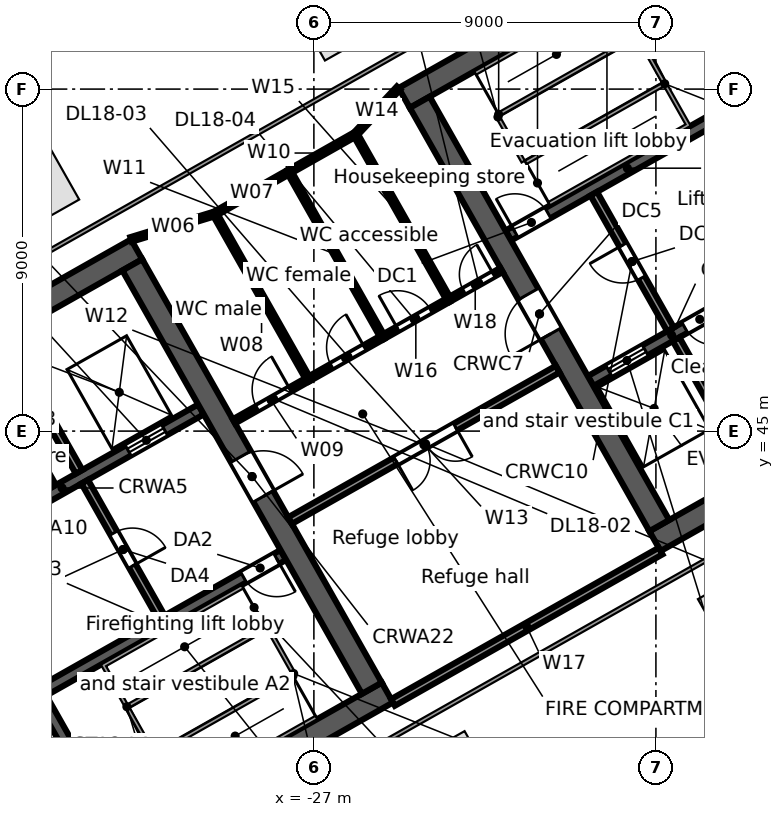
"""IFC4 building model, lengths in metres.
Left out: names, types, materials, properties, quantities, classifications, styles, units other than length and angle.
Written with IfcOpenShell. Run it as: python <this file> out.ifc"""

import sys

from ifc_helpers import new_model, si_unit, direction, frame, frame_2d, origin, origin_2d, place, context, subcontext, project, spatial, rectangle, extrude, element, fill, save


model = new_model("IFC4")
c1 = context("Model", 3, precision=1e-05, world=origin(), true_north=direction((0.0, 1.0)))
c2 = subcontext(c1, "Body", "Model", "MODEL_VIEW")
j1 = project(units=[si_unit("LENGTHUNIT", "METRE"), si_unit("PLANEANGLEUNIT", "RADIAN")], contexts=[c1])
p1 = place(None, origin())
s1 = spatial("IfcSite", under=j1, at=p1, CompositionType="ELEMENT")
p2 = place(p1, origin())
s2 = spatial("IfcBuilding", under=s1, at=p2, CompositionType="ELEMENT")
p3 = place(p2, frame((0.0, 0.0, 91.5)))
s3 = spatial("IfcBuildingStorey", under=s2, at=p3, CompositionType="ELEMENT", Elevation=91.5)
for number, where, z_axis, x_axis in (
    (1, (-26.388, 55.91, 0.0), (0.0, 0.0, 1.0), (-0.87, -0.492, 0.0)),
    (2, (-34.334, 51.414, 0.0), (0.0, 0.0, 1.0), (-0.87, -0.492, 0.0)),
    (3, (-23.356, 35.946, 0.0), (0.0, 0.0, 1.0), (0.87, 0.492, 0.0)),
    (4, (-15.736, 40.257, 0.0), (0.0, 0.0, 1.0), (0.87, 0.492, 0.0)),
):
    element("IfcColumn", number, at=place(p3, frame(where, z_axis=z_axis, x_axis=x_axis)), inside=s3, PredefinedType="COLUMN", context=c2, shape_type="SweptSolid", body=[
        extrude(rectangle(XDim=1.7, YDim=1.7, at=origin_2d()), origin(), (0.0, 0.0, 1.0), 5.6),
    ])
p4 = place(p3, frame((-39.862, 29.749, 0.0), z_axis=(0.0, 0.0, 1.0), x_axis=(0.870350116061, 0.492433422375, 0.0)))
e5 = element("IfcWall", 5, at=p4, inside=s3, PredefinedType="SOLIDWALL", context=c2, shape_type="SweptSolid", body=[
    extrude(rectangle(XDim=17.0, YDim=0.6, at=frame_2d((8.5, 0.0))), origin(), (0.0, 0.0, 1.0), 5.28),
])
p5 = place(p4, frame((7.2, 0.0, 0.0)))
e6 = element("IfcOpeningElement", 6, at=p5, cuts=e5, PredefinedType="OPENING", context=c2, shape_type="SweptSolid", body=[
    extrude(rectangle(XDim=1.2, YDim=2.1, at=frame_2d((0.6, 1.05))), frame((0.0, 0.31, 0.0), z_axis=(0.0, -1.0, 0.0), x_axis=(1.0, 0.0, 0.0)), (0.0, 0.0, 1.0), 0.62),
])
p6 = place(p3, frame((-34.245, 38.097, 0.0), z_axis=(0.0, 0.0, 1.0), x_axis=(0.870364910201, 0.492407273597, 0.0)))
e7 = element("IfcWall", 7, at=p6, inside=s3, PredefinedType="SOLIDWALL", context=c2, shape_type="SweptSolid", body=[
    extrude(rectangle(XDim=7.4, YDim=0.3, at=frame_2d((3.7, 0.0))), origin(), (0.0, 0.0, 1.0), 5.28),
])
p7 = place(p6, frame((6.2, 0.0, 0.0)))
e8 = element("IfcOpeningElement", 8, at=p7, cuts=e7, PredefinedType="OPENING", context=c2, shape_type="SweptSolid", body=[
    extrude(rectangle(XDim=1.0, YDim=2.1, at=frame_2d((0.5, 1.05))), frame((0.0, 0.16, 0.0), z_axis=(0.0, -1.0, 0.0), x_axis=(1.0, 0.0, 0.0)), (0.0, 0.0, 1.0), 0.32),
])
p8 = place(p3, frame((-37.282, 41.435, 0.0), z_axis=(0.0, 0.0, 1.0), x_axis=(0.870356516133, 0.492422110414, 0.0)))
e9 = element("IfcWall", 9, at=p8, inside=s3, PredefinedType="SOLIDWALL", context=c2, shape_type="SweptSolid", body=[
    extrude(rectangle(XDim=8.4, YDim=0.3, at=frame_2d((4.2, 0.0))), origin(), (0.0, 0.0, 1.0), 5.28),
])
p9 = place(p8, frame((6.2, 0.0, 0.0)))
e10 = element("IfcOpeningElement", 10, at=p9, cuts=e9, PredefinedType="OPENING", context=c2, shape_type="SweptSolid", body=[
    extrude(rectangle(XDim=1.1, YDim=2.1, at=frame_2d((0.55, 1.05))), frame((0.0, 0.16, 0.0), z_axis=(0.0, -1.0, 0.0), x_axis=(1.0, 0.0, 0.0)), (0.0, 0.0, 1.0), 0.32),
])
p10 = place(p8, frame((1.55, 0.0, 0.0)))
e11 = element("IfcOpeningElement", 11, at=p10, cuts=e9, PredefinedType="OPENING", context=c2, shape_type="SweptSolid", body=[
    extrude(rectangle(XDim=0.9, YDim=2.1, at=frame_2d((0.45, 1.05))), frame((0.0, 0.16, 0.0), z_axis=(0.0, -1.0, 0.0), x_axis=(1.0, 0.0, 0.0)), (0.0, 0.0, 1.0), 0.32),
])
p11 = place(p3, frame((-46.461, 41.412, 0.0), z_axis=(0.0, 0.0, 1.0), x_axis=(0.870350116061, 0.492433422375, 0.0)))
e12 = element("IfcWall", 12, at=p11, inside=s3, PredefinedType="SOLIDWALL", context=c2, shape_type="SweptSolid", body=[
    extrude(rectangle(XDim=17.0, YDim=0.6, at=frame_2d((8.5, 0.0))), origin(), (0.0, 0.0, 1.0), 5.28),
])
p12 = place(p3, frame((-34.171, 37.967, 0.0), z_axis=(0.0, 0.0, 1.0), x_axis=(0.492394910396, -0.870371904542, 0.0)))
e13 = element("IfcWall", 13, at=p12, inside=s3, PredefinedType="SOLIDWALL", context=c2, shape_type="SweptSolid", body=[
    extrude(rectangle(XDim=4.05, YDim=0.3, at=frame_2d((2.025, 0.0))), origin(), (0.0, 0.0, 1.0), 5.28),
])
p13 = place(p3, frame((-35.869, 47.06, 0.0), z_axis=(0.0, 0.0, 1.0), x_axis=(0.49241474071, -0.870360685654, 0.0)))
e14 = element("IfcWall", 14, at=p13, inside=s3, PredefinedType="SOLIDWALL", context=c2, shape_type="SweptSolid", body=[
    extrude(rectangle(XDim=4.05, YDim=0.2, at=frame_2d((2.025, 0.0))), origin(), (0.0, 0.0, 1.0), 5.28),
])
p14 = place(p3, frame((-33.031, 43.667, 0.0), z_axis=(0.0, 0.0, 1.0), x_axis=(0.492408451753, -0.87036424366, 0.0)))
e15 = element("IfcWall", 15, at=p14, inside=s3, PredefinedType="PARTITIONING", context=c2, shape_type="SweptSolid", body=[
    extrude(rectangle(XDim=4.1, YDim=0.2, at=frame_2d((2.05, 0.0))), origin(), (0.0, 0.0, 1.0), 5.28),
])
p15 = place(p14, frame((1.55, 0.0, 0.0)))
e16 = element("IfcOpeningElement", 16, at=p15, cuts=e15, PredefinedType="OPENING", context=c2, shape_type="SweptSolid", body=[
    extrude(rectangle(XDim=1.0, YDim=2.1, at=frame_2d((0.5, 1.05))), frame((0.0, 0.11, 0.0), z_axis=(0.0, -1.0, 0.0), x_axis=(1.0, 0.0, 0.0)), (0.0, 0.0, 1.0), 0.22),
])
p16 = place(p3, frame((-35.173, 47.454, 0.0), z_axis=(0.0, 0.0, 1.0), x_axis=(0.492440575896, -0.870346068648, 0.0)))
e17 = element("IfcWall", 17, at=p16, inside=s3, PredefinedType="SOLIDWALL", context=c2, shape_type="SweptSolid", body=[
    extrude(rectangle(XDim=4.05, YDim=0.2, at=frame_2d((2.025, 0.0))), origin(), (0.0, 0.0, 1.0), 5.28),
])
p17 = place(p3, frame((-31.778, 49.374, 0.0), z_axis=(0.0, 0.0, 1.0), x_axis=(0.492433046652, -0.870350328641, 0.0)))
e18 = element("IfcWall", 18, at=p17, inside=s3, PredefinedType="SOLIDWALL", context=c2, shape_type="SweptSolid", body=[
    extrude(rectangle(XDim=12.8, YDim=0.6, at=frame_2d((6.4, 0.0))), origin(), (0.0, 0.0, 1.0), 5.28),
])
p18 = place(p17, frame((5.8, 0.0, 0.0)))
e19 = element("IfcOpeningElement", 19, at=p18, cuts=e18, PredefinedType="OPENING", context=c2, shape_type="SweptSolid", body=[
    extrude(rectangle(XDim=1.2, YDim=2.1, at=frame_2d((0.6, 1.05))), frame((0.0, 0.31, 0.0), z_axis=(0.0, -1.0, 0.0), x_axis=(1.0, 0.0, 0.0)), (0.0, 0.0, 1.0), 0.62),
])
p19 = place(p3, frame((-18.024, 42.104, 0.0), z_axis=(0.0, 0.0, 1.0), x_axis=(0.870360574057, 0.492414937962, 0.0)))
e20 = element("IfcWall", 20, at=p19, inside=s3, PredefinedType="SOLIDWALL", context=c2, shape_type="SweptSolid", body=[
    extrude(rectangle(XDim=15.0, YDim=0.6, at=frame_2d((7.5, 0.0))), origin(), (0.0, 0.0, 1.0), 5.28),
])
p20 = place(p19, frame((6.1, 0.0, 0.0)))
e21 = element("IfcOpeningElement", 21, at=p20, cuts=e20, PredefinedType="OPENING", context=c2, shape_type="SweptSolid", body=[
    extrude(rectangle(XDim=1.2, YDim=2.1, at=frame_2d((0.6, 1.05))), frame((0.0, 0.31, 0.0), z_axis=(0.0, -1.0, 0.0), x_axis=(1.0, 0.0, 0.0)), (0.0, 0.0, 1.0), 0.62),
])
p21 = place(p3, frame((-19.718, 46.316, 0.0), z_axis=(0.0, 0.0, 1.0), x_axis=(0.870353963862, 0.492426621528, 0.0)))
e22 = element("IfcWall", 22, at=p21, inside=s3, PredefinedType="SOLIDWALL", context=c2, shape_type="SweptSolid", body=[
    extrude(rectangle(XDim=4.9, YDim=0.3, at=frame_2d((2.45, 0.0))), origin(), (0.0, 0.0, 1.0), 5.28),
])
p22 = place(p21, frame((0.55, 0.0, 0.0)))
e23 = element("IfcOpeningElement", 23, at=p22, cuts=e22, PredefinedType="OPENING", context=c2, shape_type="SweptSolid", body=[
    extrude(rectangle(XDim=1.1, YDim=2.1, at=frame_2d((0.55, 1.05))), frame((0.0, 0.16, 0.0), z_axis=(0.0, -1.0, 0.0), x_axis=(1.0, 0.0, 0.0)), (0.0, 0.0, 1.0), 0.32),
])
p23 = place(p21, frame((2.85, 0.0, 0.0)))
e24 = element("IfcOpeningElement", 24, at=p23, cuts=e22, PredefinedType="OPENING", context=c2, shape_type="SweptSolid", body=[
    extrude(rectangle(XDim=0.9, YDim=2.1, at=frame_2d((0.45, 1.05))), frame((0.0, 0.16, 0.0), z_axis=(0.0, -1.0, 0.0), x_axis=(1.0, 0.0, 0.0)), (0.0, 0.0, 1.0), 0.32),
])
p24 = place(p3, frame((-21.885, 50.146, 0.0), z_axis=(0.0, 0.0, 1.0), x_axis=(0.870359411463, 0.492416992881, 0.0)))
e25 = element("IfcWall", 25, at=p24, inside=s3, PredefinedType="SOLIDWALL", context=c2, shape_type="SweptSolid", body=[
    extrude(rectangle(XDim=7.2, YDim=0.3, at=frame_2d((3.6, 0.0))), origin(), (0.0, 0.0, 1.0), 5.28),
])
p25 = place(p24, frame((0.2, 0.0, 0.0)))
e26 = element("IfcOpeningElement", 26, at=p25, cuts=e25, PredefinedType="OPENING", context=c2, shape_type="SweptSolid", body=[
    extrude(rectangle(XDim=1.0, YDim=2.1, at=frame_2d((0.5, 1.05))), frame((0.0, 0.16, 0.0), z_axis=(0.0, -1.0, 0.0), x_axis=(1.0, 0.0, 0.0)), (0.0, 0.0, 1.0), 0.32),
])
p26 = place(p3, frame((-24.623, 53.767, 0.0), z_axis=(0.0, 0.0, 1.0), x_axis=(0.870356627484, 0.492421913601, 0.0)))
e27 = element("IfcWall", 27, at=p26, inside=s3, PredefinedType="SOLIDWALL", context=c2, shape_type="SweptSolid", body=[
    extrude(rectangle(XDim=15.0, YDim=0.6, at=frame_2d((7.5, 0.0))), origin(), (0.0, 0.0, 1.0), 5.28),
])
p27 = place(p3, frame((-24.214, 53.654, 0.0), z_axis=(0.0, 0.0, 1.0), x_axis=(0.492441221355, -0.870345703448, 0.0)))
e28 = element("IfcWall", 28, at=p27, inside=s3, PredefinedType="SOLIDWALL", context=c2, shape_type="SweptSolid", body=[
    extrude(rectangle(XDim=12.8, YDim=0.6, at=frame_2d((6.4, 0.0))), origin(), (0.0, 0.0, 1.0), 5.28),
])
p28 = place(p27, frame((5.8, 0.0, 0.0)))
e29 = element("IfcOpeningElement", 29, at=p28, cuts=e28, PredefinedType="OPENING", context=c2, shape_type="SweptSolid", body=[
    extrude(rectangle(XDim=1.2, YDim=2.1, at=frame_2d((0.6, 1.05))), frame((0.0, 0.31, 0.0), z_axis=(0.0, -1.0, 0.0), x_axis=(1.0, 0.0, 0.0)), (0.0, 0.0, 1.0), 0.62),
])
p29 = place(p3, frame((-17.469, 47.417, 0.0), z_axis=(0.0, 0.0, 1.0), x_axis=(0.492440575896, -0.870346068648, 0.0)))
e30 = element("IfcWall", 30, at=p29, inside=s3, PredefinedType="SOLIDWALL", context=c2, shape_type="SweptSolid", body=[
    extrude(rectangle(XDim=4.05, YDim=0.2, at=frame_2d((2.025, 0.0))), origin(), (0.0, 0.0, 1.0), 5.28),
])
p30 = place(p3, frame((-19.635, 51.246, 0.0), z_axis=(0.0, 0.0, 1.0), x_axis=(0.492408451753, -0.87036424366, 0.0)))
e31 = element("IfcWall", 31, at=p30, inside=s3, PredefinedType="PARTITIONING", context=c2, shape_type="SweptSolid", body=[
    extrude(rectangle(XDim=4.1, YDim=0.2, at=frame_2d((2.05, 0.0))), origin(), (0.0, 0.0, 1.0), 5.28),
])
p31 = place(p30, frame((1.55, 0.0, 0.0)))
e32 = element("IfcOpeningElement", 32, at=p31, cuts=e31, PredefinedType="OPENING", context=c2, shape_type="SweptSolid", body=[
    extrude(rectangle(XDim=1.0, YDim=2.1, at=frame_2d((0.5, 1.05))), frame((0.0, 0.11, 0.0), z_axis=(0.0, -1.0, 0.0), x_axis=(1.0, 0.0, 0.0)), (0.0, 0.0, 1.0), 0.22),
])
p32 = place(p3, frame((-17.686, 57.347, 0.0), z_axis=(0.0, 0.0, 1.0), x_axis=(0.492420746998, -0.870357287513, 0.0)))
e33 = element("IfcWall", 33, at=p32, inside=s3, PredefinedType="SOLIDWALL", context=c2, shape_type="SweptSolid", body=[
    extrude(rectangle(XDim=4.05, YDim=0.3, at=frame_2d((2.025, 0.0))), origin(), (0.0, 0.0, 1.0), 5.28),
])
p33 = place(p3, frame((-31.812, 50.044, 0.0), z_axis=(0.0, 0.0, 1.0), x_axis=(0.956397612161, 0.292067813107, 0.0)))
e34 = element("IfcWall", 34, at=p33, inside=s3, PredefinedType="PARTITIONING", context=c2, shape_type="SweptSolid", body=[
    extrude(rectangle(XDim=2.305, YDim=0.125, at=frame_2d((1.152, 0.0))), origin(), (0.0, 0.0, 1.0), 5.28),
])
p34 = place(p3, frame((-29.608, 50.717, 0.0), z_axis=(0.0, 0.0, 1.0), x_axis=(0.870332332106, 0.492464853254, 0.0)))
e35 = element("IfcWall", 35, at=p34, inside=s3, PredefinedType="PARTITIONING", context=c2, shape_type="SweptSolid", body=[
    extrude(rectangle(XDim=2.25, YDim=0.125, at=frame_2d((1.125, 0.0))), origin(), (0.0, 0.0, 1.0), 5.28),
])
p35 = place(p3, frame((-29.608, 50.717, 0.0), z_axis=(0.0, 0.0, 1.0), x_axis=(0.492369352746, -0.870386362759, 0.0)))
e36 = element("IfcWall", 36, at=p35, inside=s3, PredefinedType="PARTITIONING", context=c2, shape_type="SweptSolid", body=[
    extrude(rectangle(XDim=5.0, YDim=0.125, at=frame_2d((2.5, 0.0))), origin(), (0.0, 0.0, 1.0), 5.28),
])
p36 = place(p3, frame((-29.104, 45.257, 0.0), z_axis=(0.0, 0.0, 1.0), x_axis=(0.870332332106, 0.492464853254, 0.0)))
e37 = element("IfcWall", 37, at=p36, inside=s3, PredefinedType="PARTITIONING", context=c2, shape_type="SweptSolid", body=[
    extrude(rectangle(XDim=2.25, YDim=0.125, at=frame_2d((1.125, 0.0))), origin(), (0.0, 0.0, 1.0), 5.28),
])
p37 = place(p36, frame((0.7, 0.0, 0.0)))
e38 = element("IfcOpeningElement", 38, at=p37, cuts=e37, PredefinedType="OPENING", context=c2, shape_type="SweptSolid", body=[
    extrude(rectangle(XDim=1.0, YDim=2.1, at=frame_2d((0.5, 1.05))), frame((0.0, 0.073, 0.0), z_axis=(0.0, -1.0, 0.0), x_axis=(1.0, 0.0, 0.0)), (0.0, 0.0, 1.0), 0.145),
])
p38 = place(p3, frame((-27.65, 51.825, 0.0), z_axis=(0.0, 0.0, 1.0), x_axis=(0.870330884088, 0.492467412326, 0.0)))
e39 = element("IfcWall", 39, at=p38, inside=s3, PredefinedType="PARTITIONING", context=c2, shape_type="SweptSolid", body=[
    extrude(rectangle(XDim=2.0, YDim=0.125, at=frame_2d((1.0, 0.0))), origin(), (0.0, 0.0, 1.0), 5.28),
])
p39 = place(p3, frame((-27.65, 51.825, 0.0), z_axis=(0.0, 0.0, 1.0), x_axis=(0.492369352746, -0.870386362759, 0.0)))
e40 = element("IfcWall", 40, at=p39, inside=s3, PredefinedType="PARTITIONING", context=c2, shape_type="SweptSolid", body=[
    extrude(rectangle(XDim=5.0, YDim=0.125, at=frame_2d((2.5, 0.0))), origin(), (0.0, 0.0, 1.0), 5.28),
])
p40 = place(p3, frame((-27.627, 42.646, 0.0), z_axis=(0.0, 0.0, 1.0), x_axis=(0.870370568162, 0.492397272614, 0.0)))
e41 = element("IfcWall", 41, at=p40, inside=s3, PredefinedType="PARTITIONING", context=c2, shape_type="SweptSolid", body=[
    extrude(rectangle(XDim=8.091, YDim=0.2, at=frame_2d((4.045, 0.0))), origin(), (0.0, 0.0, 1.0), 4.348),
])
p41 = place(p40, frame((3.2, 0.0, 0.0)))
e42 = element("IfcOpeningElement", 42, at=p41, cuts=e41, PredefinedType="OPENING", context=c2, shape_type="SweptSolid", body=[
    extrude(rectangle(XDim=1.8, YDim=2.1, at=frame_2d((0.9, 1.05))), frame((0.0, 0.11, 0.0), z_axis=(0.0, -1.0, 0.0), x_axis=(1.0, 0.0, 0.0)), (0.0, 0.0, 1.0), 0.22),
])
p42 = place(p3, frame((-27.146, 46.365, 0.0), z_axis=(0.0, 0.0, 1.0), x_axis=(0.870332332106, 0.492464853254, 0.0)))
e43 = element("IfcWall", 43, at=p42, inside=s3, PredefinedType="PARTITIONING", context=c2, shape_type="SweptSolid", body=[
    extrude(rectangle(XDim=2.25, YDim=0.125, at=frame_2d((1.125, 0.0))), origin(), (0.0, 0.0, 1.0), 5.28),
])
p43 = place(p42, frame((0.7, 0.0, 0.0)))
e44 = element("IfcOpeningElement", 44, at=p43, cuts=e43, PredefinedType="OPENING", context=c2, shape_type="SweptSolid", body=[
    extrude(rectangle(XDim=1.0, YDim=2.1, at=frame_2d((0.5, 1.05))), frame((0.0, 0.073, 0.0), z_axis=(0.0, -1.0, 0.0), x_axis=(1.0, 0.0, 0.0)), (0.0, 0.0, 1.0), 0.145),
])
p44 = place(p3, frame((-25.909, 52.81, 0.0), z_axis=(0.0, 0.0, 1.0), x_axis=(0.682678244456, 0.730719107829, 0.0)))
e45 = element("IfcWall", 45, at=p44, inside=s3, PredefinedType="PARTITIONING", context=c2, shape_type="SweptSolid", body=[
    extrude(rectangle(XDim=1.667, YDim=0.125, at=frame_2d((0.833, 0.0))), origin(), (0.0, 0.0, 1.0), 4.348),
])
p45 = place(p3, frame((-25.909, 52.81, 0.0), z_axis=(0.0, 0.0, 1.0), x_axis=(0.492369352746, -0.870386362759, 0.0)))
e46 = element("IfcWall", 46, at=p45, inside=s3, PredefinedType="PARTITIONING", context=c2, shape_type="SweptSolid", body=[
    extrude(rectangle(XDim=5.0, YDim=0.125, at=frame_2d((2.5, 0.0))), origin(), (0.0, 0.0, 1.0), 5.28),
])
p46 = place(p3, frame((-25.188, 47.473, 0.0), z_axis=(0.0, 0.0, 1.0), x_axis=(0.870330884088, 0.492467412326, 0.0)))
e47 = element("IfcWall", 47, at=p46, inside=s3, PredefinedType="PARTITIONING", context=c2, shape_type="SweptSolid", body=[
    extrude(rectangle(XDim=2.0, YDim=0.125, at=frame_2d((1.0, 0.0))), origin(), (0.0, 0.0, 1.0), 5.28),
])
p47 = place(p46, frame((0.45, 0.0, 0.0)))
e48 = element("IfcOpeningElement", 48, at=p47, cuts=e47, PredefinedType="OPENING", context=c2, shape_type="SweptSolid", body=[
    extrude(rectangle(XDim=1.0, YDim=2.1, at=frame_2d((0.5, 1.05))), frame((0.0, 0.073, 0.0), z_axis=(0.0, -1.0, 0.0), x_axis=(1.0, 0.0, 0.0)), (0.0, 0.0, 1.0), 0.145),
])
p48 = place(p3, frame((-24.919, 37.859, 0.0), z_axis=(0.0, 0.0, 1.0), x_axis=(0.870357635969, 0.492420131098, 0.0)))
e49 = element("IfcWall", 49, at=p48, inside=s3, PredefinedType="PARTITIONING", context=c2, shape_type="SweptSolid", body=[
    extrude(rectangle(XDim=8.091, YDim=0.2, at=frame_2d((4.045, 0.0))), origin(), (0.0, 0.0, 1.0), 4.348),
])
p49 = place(p3, frame((-23.447, 48.458, 0.0), z_axis=(0.0, 0.0, 1.0), x_axis=(0.870528540927, 0.492117932443, 0.0)))
e50 = element("IfcWall", 50, at=p49, inside=s3, PredefinedType="PARTITIONING", context=c2, shape_type="SweptSolid", body=[
    extrude(rectangle(XDim=1.591, YDim=0.125, at=frame_2d((0.795, 0.0))), origin(), (0.0, 0.0, 1.0), 4.348),
])
p50 = place(p49, frame((0.45, 0.0, 0.0)))
e51 = element("IfcOpeningElement", 51, at=p50, cuts=e50, PredefinedType="OPENING", context=c2, shape_type="SweptSolid", body=[
    extrude(rectangle(XDim=0.9, YDim=2.1, at=frame_2d((0.45, 1.05))), frame((0.0, 0.073, 0.0), z_axis=(0.0, -1.0, 0.0), x_axis=(1.0, 0.0, 0.0)), (0.0, 0.0, 1.0), 0.145),
])
p51 = place(p9, origin())
e52 = element("IfcDoor", 52, at=p51, inside=s3, OperationType="DOUBLE_DOOR_SLIDING", PredefinedType="DOOR", context=c2, shape_type="SweptSolid", body=[
    extrude(rectangle(XDim=1.1, YDim=2.1, at=frame_2d((0.55, 1.05))), frame((0.0, 0.025, 0.0), z_axis=(0.0, -1.0, 0.0), x_axis=(1.0, 0.0, 0.0)), (0.0, 0.0, 1.0), 0.05),
])
fill(e10, e52)
p52 = place(p7, frame((1.0, 0.0, 0.0), z_axis=(0.0, 0.0, 1.0), x_axis=(-1.0, 0.0, 0.0)))
e53 = element("IfcDoor", 53, at=p52, inside=s3, OperationType="SINGLE_SWING_LEFT", PredefinedType="DOOR", context=c2, shape_type="SweptSolid", body=[
    extrude(rectangle(XDim=1.0, YDim=2.1, at=frame_2d((0.5, 1.05))), frame((0.0, 0.025, 0.0), z_axis=(0.0, -1.0, 0.0), x_axis=(1.0, 0.0, 0.0)), (0.0, 0.0, 1.0), 0.05),
])
fill(e8, e53)
p53 = place(p15, origin())
e54 = element("IfcDoor", 54, at=p53, inside=s3, OperationType="SINGLE_SWING_RIGHT", PredefinedType="DOOR", context=c2, shape_type="SweptSolid", body=[
    extrude(rectangle(XDim=1.0, YDim=2.1, at=frame_2d((0.5, 1.05))), frame((0.0, 0.025, 0.0), z_axis=(0.0, -1.0, 0.0), x_axis=(1.0, 0.0, 0.0)), (0.0, 0.0, 1.0), 0.05),
])
fill(e16, e54)
p54 = place(p18, origin())
e55 = element("IfcDoor", 55, at=p54, inside=s3, OperationType="SINGLE_SWING_RIGHT", PredefinedType="DOOR", context=c2, shape_type="SweptSolid", body=[
    extrude(rectangle(XDim=1.2, YDim=2.1, at=frame_2d((0.6, 1.05))), frame((0.0, 0.025, 0.0), z_axis=(0.0, -1.0, 0.0), x_axis=(1.0, 0.0, 0.0)), (0.0, 0.0, 1.0), 0.05),
])
fill(e19, e55)
p55 = place(p22, origin())
e56 = element("IfcDoor", 56, at=p55, inside=s3, OperationType="DOUBLE_DOOR_SLIDING", PredefinedType="DOOR", context=c2, shape_type="SweptSolid", body=[
    extrude(rectangle(XDim=1.1, YDim=2.1, at=frame_2d((0.55, 1.05))), frame((0.0, 0.025, 0.0), z_axis=(0.0, -1.0, 0.0), x_axis=(1.0, 0.0, 0.0)), (0.0, 0.0, 1.0), 0.05),
])
fill(e23, e56)
p56 = place(p25, origin())
e57 = element("IfcDoor", 57, at=p56, inside=s3, OperationType="SINGLE_SWING_LEFT", PredefinedType="DOOR", context=c2, shape_type="SweptSolid", body=[
    extrude(rectangle(XDim=1.0, YDim=2.1, at=frame_2d((0.5, 1.05))), frame((0.0, 0.025, 0.0), z_axis=(0.0, -1.0, 0.0), x_axis=(1.0, 0.0, 0.0)), (0.0, 0.0, 1.0), 0.05),
])
fill(e26, e57)
p57 = place(p31, frame((1.0, 0.0, 0.0), z_axis=(0.0, 0.0, 1.0), x_axis=(-1.0, 0.0, 0.0)))
e58 = element("IfcDoor", 58, at=p57, inside=s3, OperationType="SINGLE_SWING_RIGHT", PredefinedType="DOOR", context=c2, shape_type="SweptSolid", body=[
    extrude(rectangle(XDim=1.0, YDim=2.1, at=frame_2d((0.5, 1.05))), frame((0.0, 0.025, 0.0), z_axis=(0.0, -1.0, 0.0), x_axis=(1.0, 0.0, 0.0)), (0.0, 0.0, 1.0), 0.05),
])
fill(e32, e58)
p58 = place(p28, frame((1.2, 0.0, 0.0), z_axis=(0.0, 0.0, 1.0), x_axis=(-1.0, 0.0, 0.0)))
e59 = element("IfcDoor", 59, at=p58, inside=s3, OperationType="SINGLE_SWING_LEFT", PredefinedType="DOOR", context=c2, shape_type="SweptSolid", body=[
    extrude(rectangle(XDim=1.2, YDim=2.1, at=frame_2d((0.6, 1.05))), frame((0.0, 0.025, 0.0), z_axis=(0.0, -1.0, 0.0), x_axis=(1.0, 0.0, 0.0)), (0.0, 0.0, 1.0), 0.05),
])
fill(e29, e59)
p59 = place(p23, frame((0.9, 0.0, 0.0), z_axis=(0.0, 0.0, 1.0), x_axis=(-1.0, 0.0, 0.0)))
e60 = element("IfcDoor", 60, at=p59, inside=s3, OperationType="SINGLE_SWING_LEFT", PredefinedType="DOOR", context=c2, shape_type="SweptSolid", body=[
    extrude(rectangle(XDim=0.9, YDim=2.1, at=frame_2d((0.45, 1.05))), frame((0.0, 0.025, 0.0), z_axis=(0.0, -1.0, 0.0), x_axis=(1.0, 0.0, 0.0)), (0.0, 0.0, 1.0), 0.05),
])
fill(e24, e60)
p60 = place(p37, origin())
e61 = element("IfcDoor", 61, at=p60, inside=s3, OperationType="SINGLE_SWING_RIGHT", PredefinedType="DOOR", context=c2, shape_type="SweptSolid", body=[
    extrude(rectangle(XDim=1.0, YDim=2.1, at=frame_2d((0.5, 1.05))), frame((0.0, 0.025, 0.0), z_axis=(0.0, -1.0, 0.0), x_axis=(1.0, 0.0, 0.0)), (0.0, 0.0, 1.0), 0.05),
])
fill(e38, e61)
p61 = place(p43, origin())
e62 = element("IfcDoor", 62, at=p61, inside=s3, OperationType="SINGLE_SWING_RIGHT", PredefinedType="DOOR", context=c2, shape_type="SweptSolid", body=[
    extrude(rectangle(XDim=1.0, YDim=2.1, at=frame_2d((0.5, 1.05))), frame((0.0, 0.025, 0.0), z_axis=(0.0, -1.0, 0.0), x_axis=(1.0, 0.0, 0.0)), (0.0, 0.0, 1.0), 0.05),
])
fill(e44, e62)
p62 = place(p47, origin())
e63 = element("IfcDoor", 63, at=p62, inside=s3, OperationType="SINGLE_SWING_LEFT", PredefinedType="DOOR", context=c2, shape_type="SweptSolid", body=[
    extrude(rectangle(XDim=1.0, YDim=2.1, at=frame_2d((0.5, 1.05))), frame((0.0, 0.025, 0.0), z_axis=(0.0, -1.0, 0.0), x_axis=(1.0, 0.0, 0.0)), (0.0, 0.0, 1.0), 0.05),
])
fill(e48, e63)
p63 = place(p50, origin())
e64 = element("IfcDoor", 64, at=p63, inside=s3, OperationType="SINGLE_SWING_RIGHT", PredefinedType="DOOR", context=c2, shape_type="SweptSolid", body=[
    extrude(rectangle(XDim=0.9, YDim=2.1, at=frame_2d((0.45, 1.05))), frame((0.0, 0.025, 0.0), z_axis=(0.0, -1.0, 0.0), x_axis=(1.0, 0.0, 0.0)), (0.0, 0.0, 1.0), 0.05),
])
fill(e51, e64)
p64 = place(p41, frame((1.8, 0.0, 0.0), z_axis=(0.0, 0.0, 1.0), x_axis=(-1.0, 0.0, 0.0)))
e65 = element("IfcDoor", 65, at=p64, inside=s3, OperationType="DOUBLE_DOOR_SINGLE_SWING", PredefinedType="DOOR", context=c2, shape_type="SweptSolid", body=[
    extrude(rectangle(XDim=1.8, YDim=2.1, at=frame_2d((0.9, 1.05))), frame((0.0, 0.025, 0.0), z_axis=(0.0, -1.0, 0.0), x_axis=(1.0, 0.0, 0.0)), (0.0, 0.0, 1.0), 0.05),
])
fill(e42, e65)
save(model, sys.argv[1])
